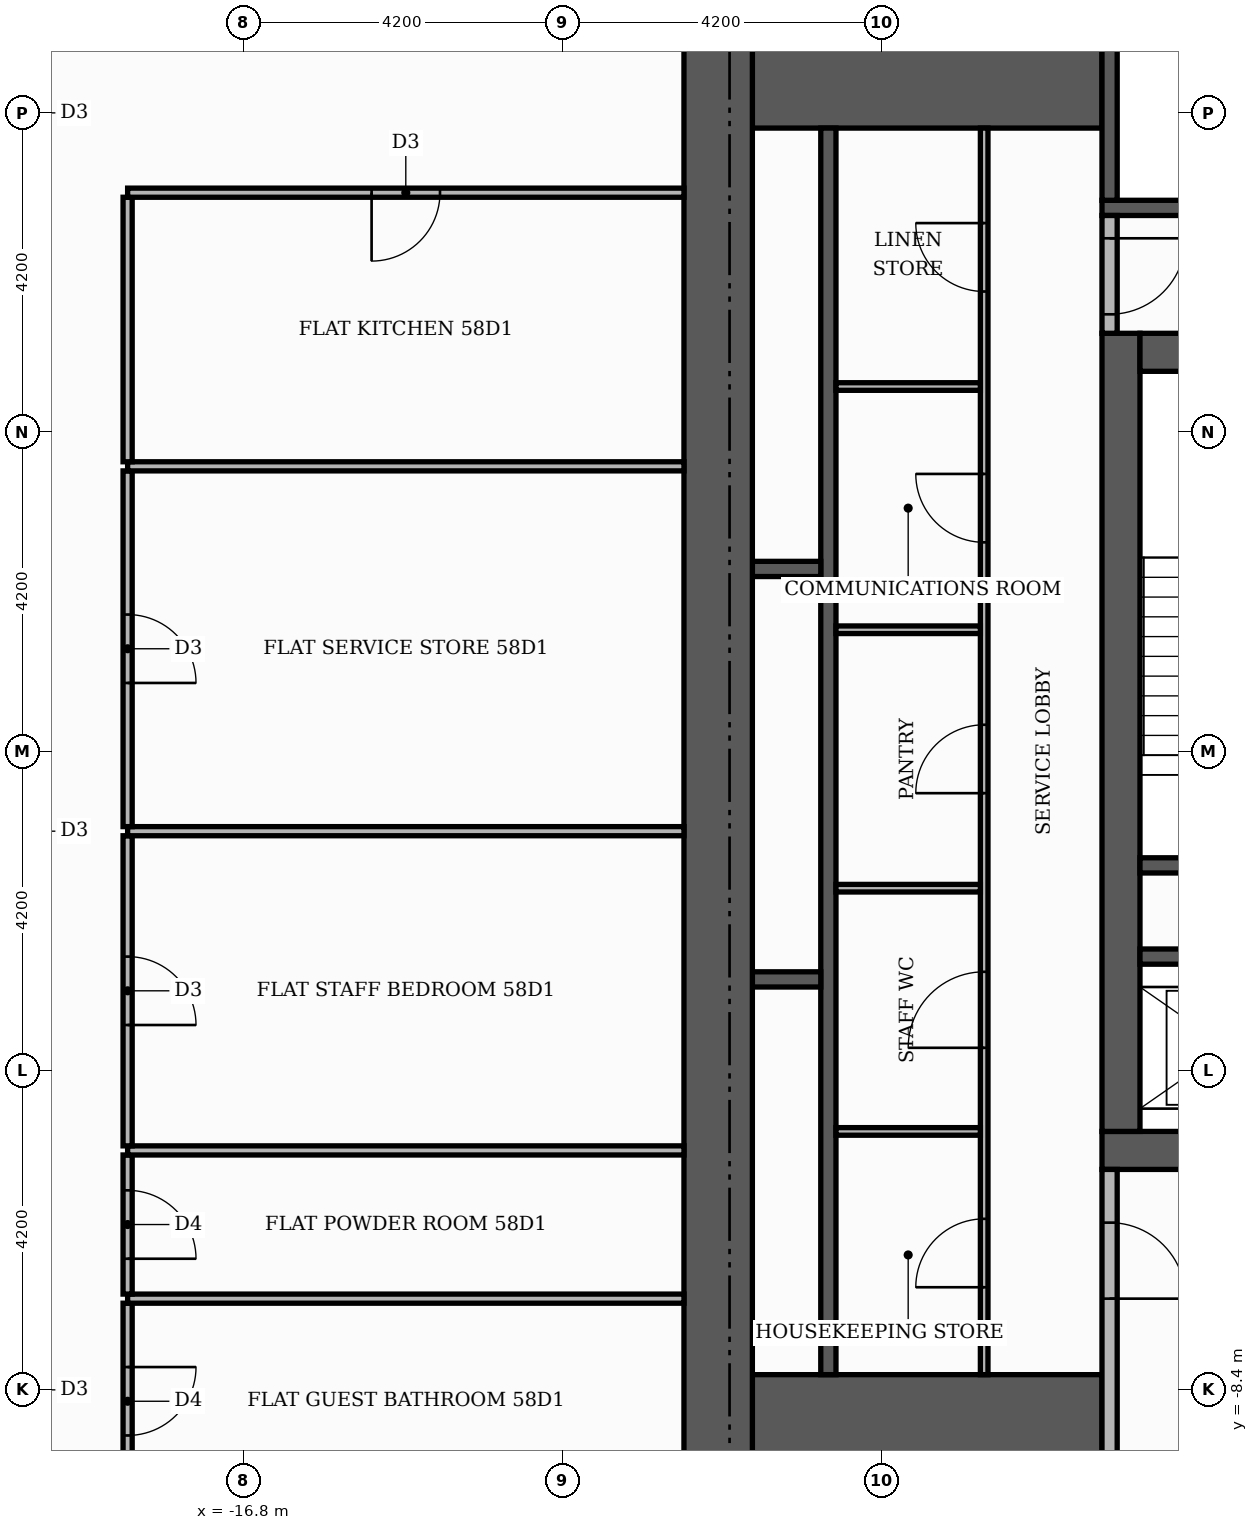
"""IFC4 building model, lengths in metres.
Left out: names, types, materials, properties, quantities, classifications, styles, units other than length and angle.
Written with IfcOpenShell. Run it as: python <this file> out.ifc"""

import sys

from ifc_helpers import new_model, si_unit, direction, frame, frame_2d, origin, place, context, subcontext, project, spatial, rectangle, extrude, element, fill, save


model = new_model("IFC4")
c1 = context("Model", 3, precision=1e-05, world=origin(), true_north=direction((0.0, 1.0)))
c2 = subcontext(c1, "Body", "Model", "MODEL_VIEW")
j1 = project(units=[si_unit("LENGTHUNIT", "METRE"), si_unit("PLANEANGLEUNIT", "RADIAN")], contexts=[c1])
p1 = place(None, origin())
s1 = spatial("IfcSite", under=j1, at=p1, CompositionType="ELEMENT")
p2 = place(p1, origin())
s2 = spatial("IfcBuilding", under=s1, at=p2, CompositionType="ELEMENT")
p3 = place(p2, frame((0.0, 0.0, 244.5)))
s3 = spatial("IfcBuildingStorey", under=s2, at=p3, CompositionType="ELEMENT", Elevation=244.5)
p4 = place(p3, frame((-5.5, -5.25, 0.0), z_axis=(0.0, 0.0, 1.0), x_axis=(1.0, 0.0, 0.0)))
e1 = element("IfcWall", 1, at=p4, inside=s3, PredefinedType="SHEAR", context=c2, shape_type="SweptSolid", body=[
    extrude(rectangle(XDim=11.0, YDim=0.5, at=frame_2d((5.5, 0.0))), origin(), (0.0, 0.0, 1.0), 3.48),
])
p5 = place(p4, frame((4.9, 0.0, 0.0)))
e2 = element("IfcOpeningElement", 2, at=p5, cuts=e1, PredefinedType="OPENING", context=c2, shape_type="SweptSolid", body=[
    extrude(rectangle(XDim=1.2, YDim=2.1, at=frame_2d((0.6, 1.05))), frame((0.0, 0.26, 0.0), z_axis=(0.0, -1.0, 0.0), x_axis=(1.0, 0.0, 0.0)), (0.0, 0.0, 1.0), 0.52),
])
p6 = place(p3, frame((-5.25, -5.0, 0.0), z_axis=(0.0, 0.0, 1.0), x_axis=(0.0, 1.0, 0.0)))
e3 = element("IfcWall", 3, at=p6, inside=s3, PredefinedType="SHEAR", context=c2, shape_type="SweptSolid", body=[
    extrude(rectangle(XDim=10.5, YDim=0.5, at=frame_2d((5.25, 0.0))), origin(), (0.0, 0.0, 1.0), 3.48),
])
p7 = place(p3, frame((-5.0, 5.25, 0.0), z_axis=(0.0, 0.0, 1.0), x_axis=(1.0, 0.0, 0.0)))
e4 = element("IfcWall", 4, at=p7, inside=s3, PredefinedType="SHEAR", context=c2, shape_type="SweptSolid", body=[
    extrude(rectangle(XDim=10.0, YDim=0.5, at=frame_2d((5.0, 0.0))), origin(), (0.0, 0.0, 1.0), 3.48),
])
p8 = place(p7, frame((4.4, 0.0, 0.0)))
e5 = element("IfcOpeningElement", 5, at=p8, cuts=e4, PredefinedType="OPENING", context=c2, shape_type="SweptSolid", body=[
    extrude(rectangle(XDim=1.2, YDim=2.1, at=frame_2d((0.6, 1.05))), frame((0.0, 0.26, 0.0), z_axis=(0.0, -1.0, 0.0), x_axis=(1.0, 0.0, 0.0)), (0.0, 0.0, 1.0), 0.52),
])
for number, where, z_axis, x_axis in (
    (6, (-10.1, -9.15, 0.0), (0.0, 0.0, 1.0), (1.0, 0.0, 0.0)),
    (7, (-10.1, 9.15, 0.0), (0.0, 0.0, 1.0), (1.0, 0.0, 0.0)),
):
    element("IfcWall", number, at=place(p3, frame(where, z_axis=z_axis, x_axis=x_axis)), inside=s3, PredefinedType="SHEAR", context=c2, shape_type="SweptSolid", body=[
        extrude(rectangle(XDim=4.6, YDim=1.9, at=frame_2d((2.3, 0.0))), origin(), (0.0, 0.0, 1.0), 3.48),
    ])
p9 = place(p3, frame((-5.0, -1.5, 0.0), z_axis=(0.0, 0.0, 1.0), x_axis=(1.0, 0.0, 0.0)))
e8 = element("IfcWall", 8, at=p9, inside=s3, PredefinedType="SHEAR", context=c2, shape_type="SweptSolid", body=[
    extrude(rectangle(XDim=3.05, YDim=0.2, at=frame_2d((1.525, 0.0))), origin(), (0.0, 0.0, 1.0), 3.48),
])
p10 = place(p3, frame((-5.5, 7.15, 0.0), z_axis=(0.0, 0.0, 1.0), x_axis=(1.0, 0.0, 0.0)))
e9 = element("IfcWall", 9, at=p10, inside=s3, PredefinedType="SHEAR", context=c2, shape_type="SweptSolid", body=[
    extrude(rectangle(XDim=6.8, YDim=0.2, at=frame_2d((3.4, 0.0))), origin(), (0.0, 0.0, 1.0), 3.48),
])
p11 = place(p3, frame((-5.4, 7.25, 0.0), z_axis=(0.0, 0.0, 1.0), x_axis=(0.0, 1.0, 0.0)))
e10 = element("IfcWall", 10, at=p11, inside=s3, PredefinedType="SHEAR", context=c2, shape_type="SweptSolid", body=[
    extrude(rectangle(XDim=2.85, YDim=0.2, at=frame_2d((1.425, 0.0))), origin(), (0.0, 0.0, 1.0), 3.48),
])
p12 = place(p3, frame((-9.1, -8.2, 0.0), z_axis=(0.0, 0.0, 1.0), x_axis=(0.0, 1.0, 0.0)))
e11 = element("IfcWall", 11, at=p12, inside=s3, PredefinedType="SHEAR", context=c2, shape_type="SweptSolid", body=[
    extrude(rectangle(XDim=16.4, YDim=0.2, at=frame_2d((8.2, 0.0))), origin(), (0.0, 0.0, 1.0), 3.48),
])
p13 = place(p3, frame((-10.1, -3.0, 0.0), z_axis=(0.0, 0.0, 1.0), x_axis=(1.0, 0.0, 0.0)))
e12 = element("IfcWall", 12, at=p13, inside=s3, PredefinedType="SHEAR", context=c2, shape_type="SweptSolid", body=[
    extrude(rectangle(XDim=0.9, YDim=0.2, at=frame_2d((0.45, 0.0))), origin(), (0.0, 0.0, 1.0), 3.48),
])
p14 = place(p3, frame((-5.0, -2.7, 0.0), z_axis=(0.0, 0.0, 1.0), x_axis=(1.0, 0.0, 0.0)))
e13 = element("IfcWall", 13, at=p14, inside=s3, PredefinedType="SHEAR", context=c2, shape_type="SweptSolid", body=[
    extrude(rectangle(XDim=2.85, YDim=0.2, at=frame_2d((1.425, 0.0))), origin(), (0.0, 0.0, 1.0), 3.48),
])
p15 = place(p3, frame((-10.1, 2.4, 0.0), z_axis=(0.0, 0.0, 1.0), x_axis=(1.0, 0.0, 0.0)))
e14 = element("IfcWall", 14, at=p15, inside=s3, PredefinedType="SHEAR", context=c2, shape_type="SweptSolid", body=[
    extrude(rectangle(XDim=0.9, YDim=0.2, at=frame_2d((0.45, 0.0))), origin(), (0.0, 0.0, 1.0), 3.48),
])
p16 = place(p3, frame((-10.55, -10.1, 0.0), z_axis=(0.0, 0.0, 1.0), x_axis=(0.0, 1.0, 0.0)))
e15 = element("IfcWall", 15, at=p16, inside=s3, PredefinedType="SHEAR", context=c2, shape_type="SweptSolid", body=[
    extrude(rectangle(XDim=20.2, YDim=0.9, at=frame_2d((10.1, 0.0))), origin(), (0.0, 0.0, 1.0), 3.48),
])
p17 = place(p3, frame((-5.4, -10.1, 0.0), z_axis=(0.0, 0.0, 1.0), x_axis=(0.0, 1.0, 0.0)))
e16 = element("IfcWall", 16, at=p17, inside=s3, PredefinedType="PARTITIONING", context=c2, shape_type="SweptSolid", body=[
    extrude(rectangle(XDim=4.6, YDim=0.2, at=frame_2d((2.3, 0.0))), origin(), (0.0, 0.0, 1.0), 3.48),
])
p18 = place(p17, frame((2.9, 0.0, 0.0)))
e17 = element("IfcOpeningElement", 17, at=p18, cuts=e16, PredefinedType="OPENING", context=c2, shape_type="SweptSolid", body=[
    extrude(rectangle(XDim=1.0, YDim=2.1, at=frame_2d((0.5, 1.05))), frame((0.0, 0.11, 0.0), z_axis=(0.0, -1.0, 0.0), x_axis=(1.0, 0.0, 0.0)), (0.0, 0.0, 1.0), 0.22),
])
p19 = place(p3, frame((-7.05, -8.2, 0.0), z_axis=(0.0, 0.0, 1.0), x_axis=(0.0, 1.0, 0.0)))
e18 = element("IfcWall", 18, at=p19, inside=s3, PredefinedType="PARTITIONING", context=c2, shape_type="SweptSolid", body=[
    extrude(rectangle(XDim=16.4, YDim=0.1, at=frame_2d((8.2, 0.0))), origin(), (0.0, 0.0, 1.0), 3.48),
])
p20 = place(p19, frame((1.15, 0.0, 0.0)))
e19 = element("IfcOpeningElement", 19, at=p20, cuts=e18, PredefinedType="OPENING", context=c2, shape_type="SweptSolid", body=[
    extrude(rectangle(XDim=0.9, YDim=2.1, at=frame_2d((0.45, 1.05))), frame((0.0, 0.06, 0.0), z_axis=(0.0, -1.0, 0.0), x_axis=(1.0, 0.0, 0.0)), (0.0, 0.0, 1.0), 0.12),
])
p21 = place(p19, frame((4.3, 0.0, 0.0)))
e20 = element("IfcOpeningElement", 20, at=p21, cuts=e18, PredefinedType="OPENING", context=c2, shape_type="SweptSolid", body=[
    extrude(rectangle(XDim=1.0, YDim=2.1, at=frame_2d((0.5, 1.05))), frame((0.0, 0.06, 0.0), z_axis=(0.0, -1.0, 0.0), x_axis=(1.0, 0.0, 0.0)), (0.0, 0.0, 1.0), 0.12),
])
p22 = place(p19, frame((7.65, 0.0, 0.0)))
e21 = element("IfcOpeningElement", 21, at=p22, cuts=e18, PredefinedType="OPENING", context=c2, shape_type="SweptSolid", body=[
    extrude(rectangle(XDim=0.9, YDim=2.1, at=frame_2d((0.45, 1.05))), frame((0.0, 0.06, 0.0), z_axis=(0.0, -1.0, 0.0), x_axis=(1.0, 0.0, 0.0)), (0.0, 0.0, 1.0), 0.12),
])
p23 = place(p19, frame((10.95, 0.0, 0.0)))
e22 = element("IfcOpeningElement", 22, at=p23, cuts=e18, PredefinedType="OPENING", context=c2, shape_type="SweptSolid", body=[
    extrude(rectangle(XDim=0.9, YDim=2.1, at=frame_2d((0.45, 1.05))), frame((0.0, 0.06, 0.0), z_axis=(0.0, -1.0, 0.0), x_axis=(1.0, 0.0, 0.0)), (0.0, 0.0, 1.0), 0.12),
])
p24 = place(p19, frame((14.25, 0.0, 0.0)))
e23 = element("IfcOpeningElement", 23, at=p24, cuts=e18, PredefinedType="OPENING", context=c2, shape_type="SweptSolid", body=[
    extrude(rectangle(XDim=0.9, YDim=2.1, at=frame_2d((0.45, 1.05))), frame((0.0, 0.06, 0.0), z_axis=(0.0, -1.0, 0.0), x_axis=(1.0, 0.0, 0.0)), (0.0, 0.0, 1.0), 0.12),
])
for number, where, z_axis, x_axis in (
    (24, (-9.0, -5.0, 0.0), (0.0, 0.0, 1.0), (1.0, 0.0, 0.0)),
    (25, (-9.0, -1.8, 0.0), (0.0, 0.0, 1.0), (1.0, 0.0, 0.0)),
    (26, (-9.0, 1.6, 0.0), (0.0, 0.0, 1.0), (1.0, 0.0, 0.0)),
    (27, (-9.0, 4.8, 0.0), (0.0, 0.0, 1.0), (1.0, 0.0, 0.0)),
):
    element("IfcWall", number, at=place(p3, frame(where, z_axis=z_axis, x_axis=x_axis)), inside=s3, PredefinedType="PARTITIONING", context=c2, shape_type="SweptSolid", body=[
        extrude(rectangle(XDim=1.9, YDim=0.1, at=frame_2d((0.95, 0.0))), origin(), (0.0, 0.0, 1.0), 3.48),
    ])
p25 = place(p3, frame((-5.4, 5.5, 0.0), z_axis=(0.0, 0.0, 1.0), x_axis=(0.0, 1.0, 0.0)))
e28 = element("IfcWall", 28, at=p25, inside=s3, PredefinedType="PARTITIONING", context=c2, shape_type="SweptSolid", body=[
    extrude(rectangle(XDim=1.55, YDim=0.2, at=frame_2d((0.775, 0.0))), origin(), (0.0, 0.0, 1.0), 3.48),
])
p26 = place(p25, frame((0.25, 0.0, 0.0)))
e29 = element("IfcOpeningElement", 29, at=p26, cuts=e28, PredefinedType="OPENING", context=c2, shape_type="SweptSolid", body=[
    extrude(rectangle(XDim=1.0, YDim=2.1, at=frame_2d((0.5, 1.05))), frame((0.0, 0.11, 0.0), z_axis=(0.0, -1.0, 0.0), x_axis=(1.0, 0.0, 0.0)), (0.0, 0.0, 1.0), 0.22),
])
p27 = place(p3, frame((-18.32, -9.84, 0.0), z_axis=(0.0, 0.0, 1.0), x_axis=(0.0, 1.0, 0.0)))
e30 = element("IfcWall", 30, at=p27, inside=s3, PredefinedType="PARTITIONING", context=c2, shape_type="SweptSolid", body=[
    extrude(rectangle(XDim=2.58, YDim=0.12, at=frame_2d((1.29, 0.0))), origin(), (0.0, 0.0, 1.0), 3.48),
])
p28 = place(p27, frame((0.84, 0.0, 0.0)))
e31 = element("IfcOpeningElement", 31, at=p28, cuts=e30, PredefinedType="OPENING", context=c2, shape_type="SweptSolid", body=[
    extrude(rectangle(XDim=0.9, YDim=2.1, at=frame_2d((0.45, 1.05))), frame((0.0, 0.07, 0.0), z_axis=(0.0, -1.0, 0.0), x_axis=(1.0, 0.0, 0.0)), (0.0, 0.0, 1.0), 0.14),
])
p29 = place(p3, frame((-18.32, -7.2, 0.0), z_axis=(0.0, 0.0, 1.0), x_axis=(1.0, 0.0, 0.0)))
e32 = element("IfcWall", 32, at=p29, inside=s3, PredefinedType="PARTITIONING", context=c2, shape_type="SweptSolid", body=[
    extrude(rectangle(XDim=7.32, YDim=0.12, at=frame_2d((3.66, 0.0))), origin(), (0.0, 0.0, 1.0), 3.48),
])
p30 = place(p3, frame((-18.32, -7.14, 0.0), z_axis=(0.0, 0.0, 1.0), x_axis=(0.0, 1.0, 0.0)))
e33 = element("IfcWall", 33, at=p30, inside=s3, PredefinedType="PARTITIONING", context=c2, shape_type="SweptSolid", body=[
    extrude(rectangle(XDim=1.83, YDim=0.12, at=frame_2d((0.915, 0.0))), origin(), (0.0, 0.0, 1.0), 3.48),
])
p31 = place(p30, frame((0.465, 0.0, 0.0)))
e34 = element("IfcOpeningElement", 34, at=p31, cuts=e33, PredefinedType="OPENING", context=c2, shape_type="SweptSolid", body=[
    extrude(rectangle(XDim=0.9, YDim=2.1, at=frame_2d((0.45, 1.05))), frame((0.0, 0.07, 0.0), z_axis=(0.0, -1.0, 0.0), x_axis=(1.0, 0.0, 0.0)), (0.0, 0.0, 1.0), 0.14),
])
p32 = place(p3, frame((-18.32, -5.25, 0.0), z_axis=(0.0, 0.0, 1.0), x_axis=(1.0, 0.0, 0.0)))
e35 = element("IfcWall", 35, at=p32, inside=s3, PredefinedType="PARTITIONING", context=c2, shape_type="SweptSolid", body=[
    extrude(rectangle(XDim=7.32, YDim=0.12, at=frame_2d((3.66, 0.0))), origin(), (0.0, 0.0, 1.0), 3.48),
])
p33 = place(p3, frame((-18.32, -5.19, 0.0), z_axis=(0.0, 0.0, 1.0), x_axis=(0.0, 1.0, 0.0)))
e36 = element("IfcWall", 36, at=p33, inside=s3, PredefinedType="PARTITIONING", context=c2, shape_type="SweptSolid", body=[
    extrude(rectangle(XDim=4.08, YDim=0.12, at=frame_2d((2.04, 0.0))), origin(), (0.0, 0.0, 1.0), 3.48),
])
p34 = place(p33, frame((1.59, 0.0, 0.0)))
e37 = element("IfcOpeningElement", 37, at=p34, cuts=e36, PredefinedType="OPENING", context=c2, shape_type="SweptSolid", body=[
    extrude(rectangle(XDim=0.9, YDim=2.1, at=frame_2d((0.45, 1.05))), frame((0.0, 0.07, 0.0), z_axis=(0.0, -1.0, 0.0), x_axis=(1.0, 0.0, 0.0)), (0.0, 0.0, 1.0), 0.14),
])
p35 = place(p3, frame((-18.32, -1.05, 0.0), z_axis=(0.0, 0.0, 1.0), x_axis=(1.0, 0.0, 0.0)))
e38 = element("IfcWall", 38, at=p35, inside=s3, PredefinedType="PARTITIONING", context=c2, shape_type="SweptSolid", body=[
    extrude(rectangle(XDim=7.32, YDim=0.12, at=frame_2d((3.66, 0.0))), origin(), (0.0, 0.0, 1.0), 3.48),
])
p36 = place(p3, frame((-18.32, -0.99, 0.0), z_axis=(0.0, 0.0, 1.0), x_axis=(0.0, 1.0, 0.0)))
e39 = element("IfcWall", 39, at=p36, inside=s3, PredefinedType="PARTITIONING", context=c2, shape_type="SweptSolid", body=[
    extrude(rectangle(XDim=4.68, YDim=0.12, at=frame_2d((2.34, 0.0))), origin(), (0.0, 0.0, 1.0), 3.48),
])
p37 = place(p36, frame((1.89, 0.0, 0.0)))
e40 = element("IfcOpeningElement", 40, at=p37, cuts=e39, PredefinedType="OPENING", context=c2, shape_type="SweptSolid", body=[
    extrude(rectangle(XDim=0.9, YDim=2.1, at=frame_2d((0.45, 1.05))), frame((0.0, 0.07, 0.0), z_axis=(0.0, -1.0, 0.0), x_axis=(1.0, 0.0, 0.0)), (0.0, 0.0, 1.0), 0.14),
])
p38 = place(p3, frame((-18.32, 3.75, 0.0), z_axis=(0.0, 0.0, 1.0), x_axis=(1.0, 0.0, 0.0)))
e41 = element("IfcWall", 41, at=p38, inside=s3, PredefinedType="PARTITIONING", context=c2, shape_type="SweptSolid", body=[
    extrude(rectangle(XDim=7.32, YDim=0.12, at=frame_2d((3.66, 0.0))), origin(), (0.0, 0.0, 1.0), 3.48),
])
p39 = place(p3, frame((-18.32, 3.81, 0.0), z_axis=(0.0, 0.0, 1.0), x_axis=(0.0, 1.0, 0.0)))
e42 = element("IfcWall", 42, at=p39, inside=s3, PredefinedType="PARTITIONING", context=c2, shape_type="SweptSolid", body=[
    extrude(rectangle(XDim=3.48, YDim=0.12, at=frame_2d((1.74, 0.0))), origin(), (0.0, 0.0, 1.0), 3.48),
])
p40 = place(p3, frame((-18.32, 7.35, 0.0), z_axis=(0.0, 0.0, 1.0), x_axis=(1.0, 0.0, 0.0)))
e43 = element("IfcWall", 43, at=p40, inside=s3, PredefinedType="PARTITIONING", context=c2, shape_type="SweptSolid", body=[
    extrude(rectangle(XDim=7.32, YDim=0.12, at=frame_2d((3.66, 0.0))), origin(), (0.0, 0.0, 1.0), 3.48),
])
p41 = place(p40, frame((3.21, 0.0, 0.0)))
e44 = element("IfcOpeningElement", 44, at=p41, cuts=e43, PredefinedType="OPENING", context=c2, shape_type="SweptSolid", body=[
    extrude(rectangle(XDim=0.9, YDim=2.1, at=frame_2d((0.45, 1.05))), frame((0.0, 0.07, 0.0), z_axis=(0.0, -1.0, 0.0), x_axis=(1.0, 0.0, 0.0)), (0.0, 0.0, 1.0), 0.14),
])
p42 = place(p26, frame((1.0, 0.0, 0.0), z_axis=(0.0, 0.0, 1.0), x_axis=(-1.0, 0.0, 0.0)))
e45 = element("IfcDoor", 45, at=p42, inside=s3, OperationType="SINGLE_SWING_RIGHT", PredefinedType="DOOR", context=c2, shape_type="SweptSolid", body=[
    extrude(rectangle(XDim=1.0, YDim=2.1, at=frame_2d((0.5, 1.05))), frame((0.0, 0.025, 0.0), z_axis=(0.0, -1.0, 0.0), x_axis=(1.0, 0.0, 0.0)), (0.0, 0.0, 1.0), 0.05),
])
fill(e29, e45)
p43 = place(p18, frame((1.0, 0.0, 0.0), z_axis=(0.0, 0.0, 1.0), x_axis=(-1.0, 0.0, 0.0)))
e46 = element("IfcDoor", 46, at=p43, inside=s3, OperationType="SINGLE_SWING_LEFT", PredefinedType="DOOR", context=c2, shape_type="SweptSolid", body=[
    extrude(rectangle(XDim=1.0, YDim=2.1, at=frame_2d((0.5, 1.05))), frame((0.0, 0.025, 0.0), z_axis=(0.0, -1.0, 0.0), x_axis=(1.0, 0.0, 0.0)), (0.0, 0.0, 1.0), 0.05),
])
fill(e17, e46)
p44 = place(p20, origin())
e47 = element("IfcDoor", 47, at=p44, inside=s3, OperationType="SINGLE_SWING_LEFT", PredefinedType="DOOR", context=c2, shape_type="SweptSolid", body=[
    extrude(rectangle(XDim=0.9, YDim=2.1, at=frame_2d((0.45, 1.05))), frame((0.0, 0.025, 0.0), z_axis=(0.0, -1.0, 0.0), x_axis=(1.0, 0.0, 0.0)), (0.0, 0.0, 1.0), 0.05),
])
fill(e19, e47)
p45 = place(p21, origin())
e48 = element("IfcDoor", 48, at=p45, inside=s3, OperationType="SINGLE_SWING_LEFT", PredefinedType="DOOR", context=c2, shape_type="SweptSolid", body=[
    extrude(rectangle(XDim=1.0, YDim=2.1, at=frame_2d((0.5, 1.05))), frame((0.0, 0.025, 0.0), z_axis=(0.0, -1.0, 0.0), x_axis=(1.0, 0.0, 0.0)), (0.0, 0.0, 1.0), 0.05),
])
fill(e20, e48)
p46 = place(p22, origin())
e49 = element("IfcDoor", 49, at=p46, inside=s3, OperationType="SINGLE_SWING_LEFT", PredefinedType="DOOR", context=c2, shape_type="SweptSolid", body=[
    extrude(rectangle(XDim=0.9, YDim=2.1, at=frame_2d((0.45, 1.05))), frame((0.0, 0.025, 0.0), z_axis=(0.0, -1.0, 0.0), x_axis=(1.0, 0.0, 0.0)), (0.0, 0.0, 1.0), 0.05),
])
fill(e21, e49)
p47 = place(p23, origin())
e50 = element("IfcDoor", 50, at=p47, inside=s3, OperationType="SINGLE_SWING_RIGHT", PredefinedType="DOOR", context=c2, shape_type="SweptSolid", body=[
    extrude(rectangle(XDim=0.9, YDim=2.1, at=frame_2d((0.45, 1.05))), frame((0.0, 0.025, 0.0), z_axis=(0.0, -1.0, 0.0), x_axis=(1.0, 0.0, 0.0)), (0.0, 0.0, 1.0), 0.05),
])
fill(e22, e50)
p48 = place(p24, origin())
e51 = element("IfcDoor", 51, at=p48, inside=s3, OperationType="SINGLE_SWING_RIGHT", PredefinedType="DOOR", context=c2, shape_type="SweptSolid", body=[
    extrude(rectangle(XDim=0.9, YDim=2.1, at=frame_2d((0.45, 1.05))), frame((0.0, 0.025, 0.0), z_axis=(0.0, -1.0, 0.0), x_axis=(1.0, 0.0, 0.0)), (0.0, 0.0, 1.0), 0.05),
])
fill(e23, e51)
p49 = place(p41, frame((0.9, 0.0, 0.0), z_axis=(0.0, 0.0, 1.0), x_axis=(-1.0, 0.0, 0.0)))
e52 = element("IfcDoor", 52, at=p49, inside=s3, OperationType="SINGLE_SWING_LEFT", PredefinedType="DOOR", context=c2, shape_type="SweptSolid", body=[
    extrude(rectangle(XDim=0.9, YDim=2.1, at=frame_2d((0.45, 1.05))), frame((0.0, 0.025, 0.0), z_axis=(0.0, -1.0, 0.0), x_axis=(1.0, 0.0, 0.0)), (0.0, 0.0, 1.0), 0.05),
])
fill(e44, e52)
p50 = place(p37, frame((0.9, 0.0, 0.0), z_axis=(0.0, 0.0, 1.0), x_axis=(-1.0, 0.0, 0.0)))
e53 = element("IfcDoor", 53, at=p50, inside=s3, OperationType="SINGLE_SWING_LEFT", PredefinedType="DOOR", context=c2, shape_type="SweptSolid", body=[
    extrude(rectangle(XDim=0.9, YDim=2.1, at=frame_2d((0.45, 1.05))), frame((0.0, 0.025, 0.0), z_axis=(0.0, -1.0, 0.0), x_axis=(1.0, 0.0, 0.0)), (0.0, 0.0, 1.0), 0.05),
])
fill(e40, e53)
p51 = place(p34, frame((0.9, 0.0, 0.0), z_axis=(0.0, 0.0, 1.0), x_axis=(-1.0, 0.0, 0.0)))
e54 = element("IfcDoor", 54, at=p51, inside=s3, OperationType="SINGLE_SWING_LEFT", PredefinedType="DOOR", context=c2, shape_type="SweptSolid", body=[
    extrude(rectangle(XDim=0.9, YDim=2.1, at=frame_2d((0.45, 1.05))), frame((0.0, 0.025, 0.0), z_axis=(0.0, -1.0, 0.0), x_axis=(1.0, 0.0, 0.0)), (0.0, 0.0, 1.0), 0.05),
])
fill(e37, e54)
p52 = place(p31, frame((0.9, 0.0, 0.0), z_axis=(0.0, 0.0, 1.0), x_axis=(-1.0, 0.0, 0.0)))
e55 = element("IfcDoor", 55, at=p52, inside=s3, OperationType="SINGLE_SWING_LEFT", PredefinedType="DOOR", context=c2, shape_type="SweptSolid", body=[
    extrude(rectangle(XDim=0.9, YDim=2.1, at=frame_2d((0.45, 1.05))), frame((0.0, 0.025, 0.0), z_axis=(0.0, -1.0, 0.0), x_axis=(1.0, 0.0, 0.0)), (0.0, 0.0, 1.0), 0.05),
])
fill(e34, e55)
p53 = place(p28, frame((0.9, 0.0, 0.0), z_axis=(0.0, 0.0, 1.0), x_axis=(-1.0, 0.0, 0.0)))
e56 = element("IfcDoor", 56, at=p53, inside=s3, OperationType="SINGLE_SWING_RIGHT", PredefinedType="DOOR", context=c2, shape_type="SweptSolid", body=[
    extrude(rectangle(XDim=0.9, YDim=2.1, at=frame_2d((0.45, 1.05))), frame((0.0, 0.025, 0.0), z_axis=(0.0, -1.0, 0.0), x_axis=(1.0, 0.0, 0.0)), (0.0, 0.0, 1.0), 0.05),
])
fill(e31, e56)
save(model, sys.argv[1])
